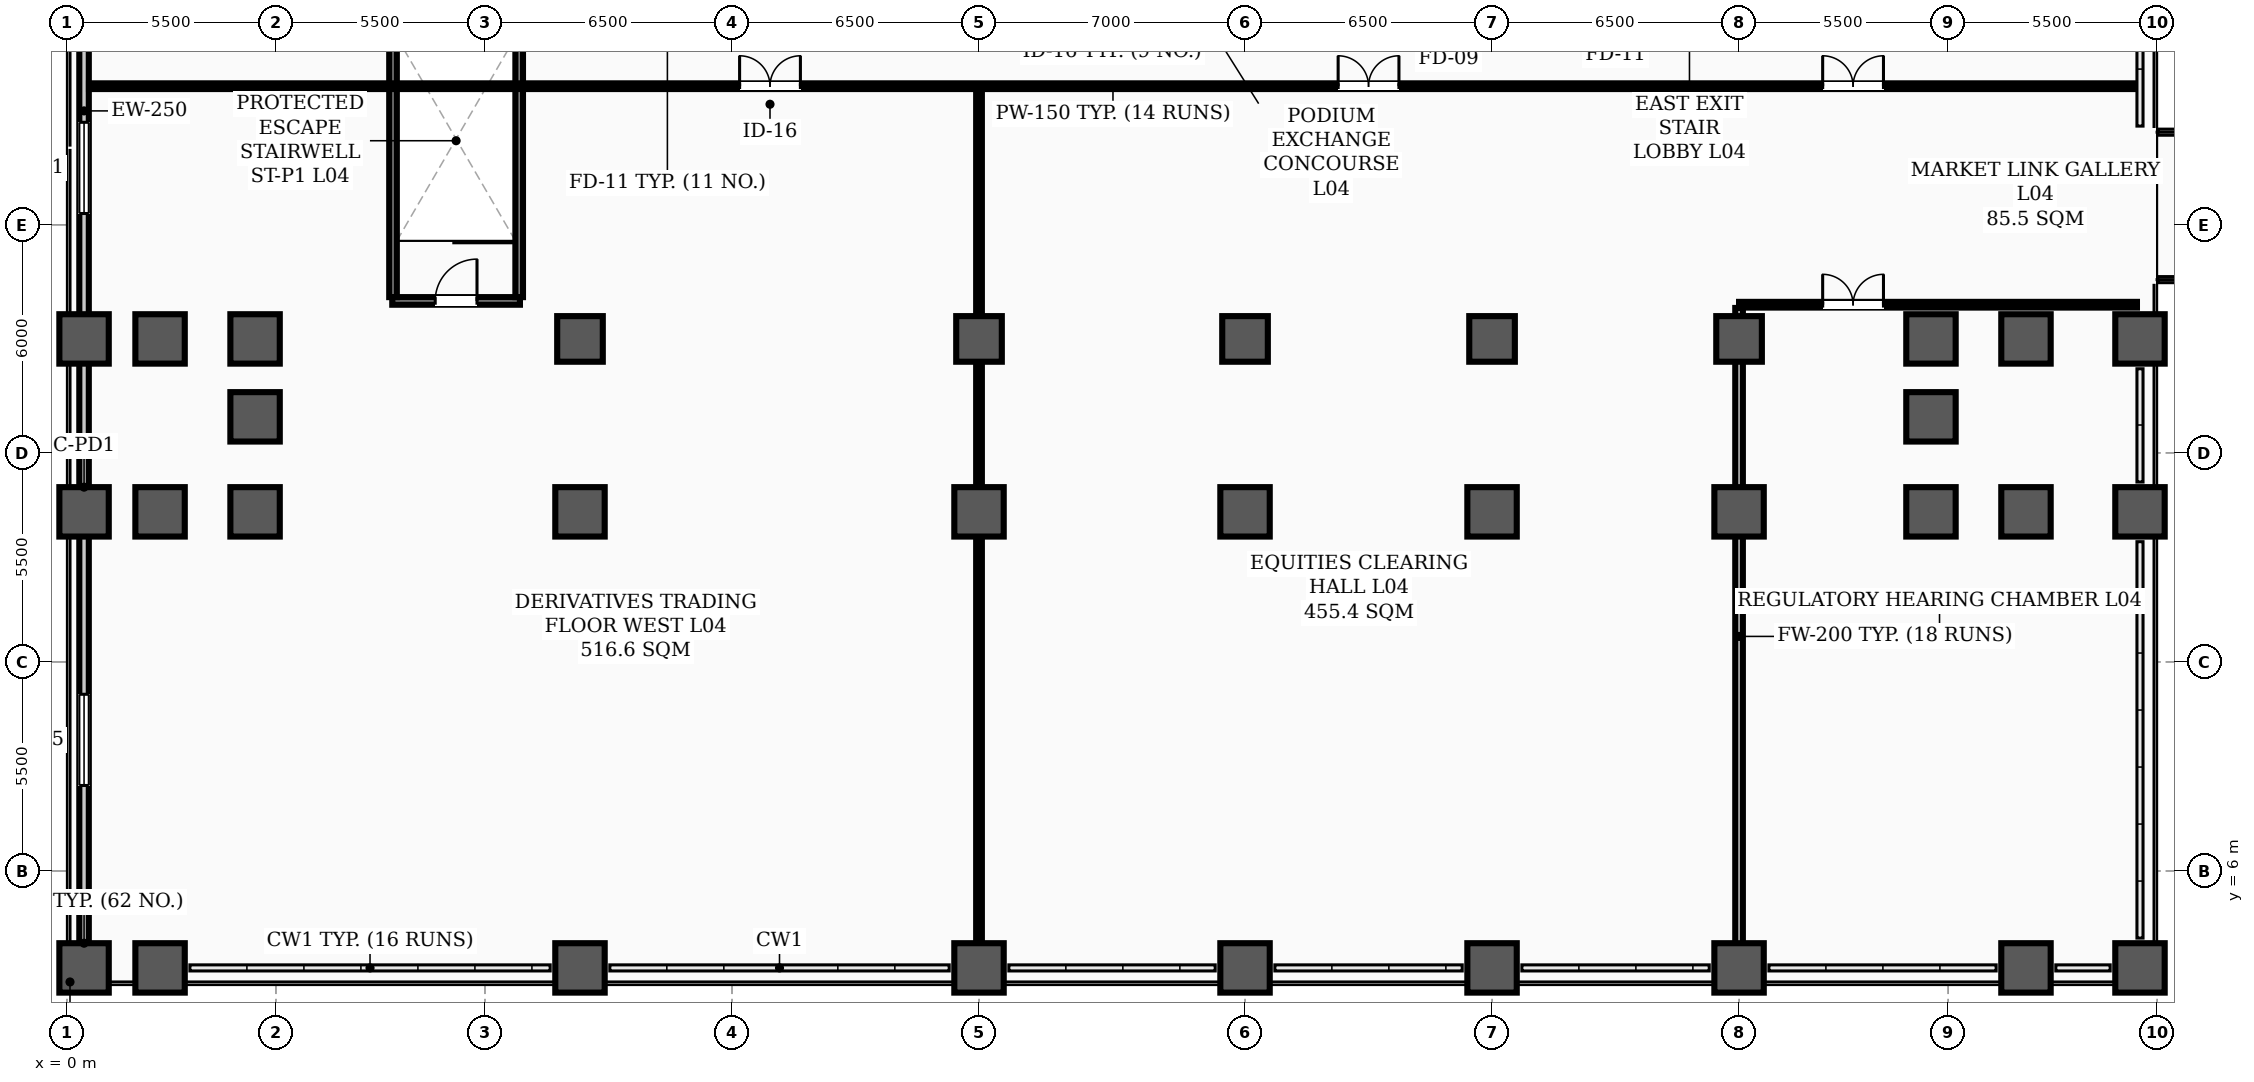
"""IFC4 building model, lengths in metres.
Left out: names, types, materials, properties, quantities, classifications, styles, units other than length and angle.
Written with IfcOpenShell. Run it as: python <this file> out.ifc"""

import sys

from ifc_helpers import new_model, si_unit, direction, frame, frame_2d, origin, origin_2d, place, context, subcontext, project, spatial, rectangle, hollow_rectangle, extrude, element, fill, save


model = new_model("IFC4")
c1 = context("Model", 3, precision=1e-05, world=origin(), true_north=direction((0.0, 1.0)))
c2 = subcontext(c1, "Body", "Model", "MODEL_VIEW")
j1 = project(units=[si_unit("LENGTHUNIT", "METRE"), si_unit("PLANEANGLEUNIT", "RADIAN")], contexts=[c1])
p1 = place(None, origin())
s1 = spatial("IfcSite", under=j1, at=p1, CompositionType="ELEMENT")
p2 = place(p1, origin())
s2 = spatial("IfcBuilding", under=s1, at=p2, CompositionType="ELEMENT")
p3 = place(p2, frame((0.0, 0.0, 16.6)))
s3 = spatial("IfcBuildingStorey", under=s2, at=p3, CompositionType="ELEMENT", Elevation=16.6)
for number, where, z_axis, x_axis in (
    (1, (13.5, 20.0, 0.0), (0.0, 0.0, 1.0), (1.0, 0.0, 0.0)),
    (2, (24.0, 20.0, 0.0), (0.0, 0.0, 1.0), (1.0, 0.0, 0.0)),
    (3, (31.0, 20.0, 0.0), (0.0, 0.0, 1.0), (1.0, 0.0, 0.0)),
    (4, (37.5, 20.0, 0.0), (0.0, 0.0, 1.0), (1.0, 0.0, 0.0)),
    (5, (44.0, 20.0, 0.0), (0.0, 0.0, 1.0), (1.0, 0.0, 0.0)),
):
    element("IfcColumn", number, at=place(p3, frame(where, z_axis=z_axis, x_axis=x_axis)), inside=s3, PredefinedType="COLUMN", context=c2, shape_type="SweptSolid", body=[
        extrude(hollow_rectangle(XDim=1.2, YDim=1.2, WallThickness=0.04, InnerFilletRadius=0.02, OuterFilletRadius=0.06, at=origin_2d()), origin(), (0.0, 0.0, 1.0), 5.4),
    ])
p4 = place(p3, frame((0.45, 3.45, 0.0), z_axis=(0.0, 0.0, 1.0), x_axis=(1.0, 0.0, 0.0)))
e6 = element("IfcColumn", 6, at=p4, inside=s3, PredefinedType="COLUMN", context=c2, shape_type="SweptSolid", body=[
    extrude(rectangle(XDim=1.3, YDim=1.3, at=origin_2d()), origin(), (0.0, 0.0, 1.0), 5.15),
])
for number, where, z_axis, x_axis in (
    (7, (0.45, 15.45, 0.0), (0.0, 0.0, 1.0), (1.0, 0.0, 0.0)),
    (8, (0.45, 20.0, 0.0), (0.0, 0.0, 1.0), (1.0, 0.0, 0.0)),
):
    element("IfcColumn", number, at=place(p3, frame(where, z_axis=z_axis, x_axis=x_axis)), inside=s3, PredefinedType="COLUMN", context=c2, shape_type="SweptSolid", body=[
        extrude(rectangle(XDim=1.3, YDim=1.3, at=origin_2d()), origin(), (0.0, 0.0, 1.0), 5.16),
    ])
p5 = place(p3, frame((2.45, 3.45, 0.0), z_axis=(0.0, 0.0, 1.0), x_axis=(1.0, 0.0, 0.0)))
e9 = element("IfcColumn", 9, at=p5, inside=s3, PredefinedType="COLUMN", context=c2, shape_type="SweptSolid", body=[
    extrude(rectangle(XDim=1.3, YDim=1.3, at=origin_2d()), origin(), (0.0, 0.0, 1.0), 5.15),
])
for number, where, z_axis, x_axis in (
    (10, (2.45, 15.45, 0.0), (0.0, 0.0, 1.0), (1.0, 0.0, 0.0)),
    (11, (2.45, 20.0, 0.0), (0.0, 0.0, 1.0), (1.0, 0.0, 0.0)),
    (12, (4.95, 15.45, 0.0), (0.0, 0.0, 1.0), (1.0, 0.0, 0.0)),
    (13, (4.95, 17.95, 0.0), (0.0, 0.0, 1.0), (1.0, 0.0, 0.0)),
    (14, (4.95, 20.0, 0.0), (0.0, 0.0, 1.0), (1.0, 0.0, 0.0)),
):
    element("IfcColumn", number, at=place(p3, frame(where, z_axis=z_axis, x_axis=x_axis)), inside=s3, PredefinedType="COLUMN", context=c2, shape_type="SweptSolid", body=[
        extrude(rectangle(XDim=1.3, YDim=1.3, at=origin_2d()), origin(), (0.0, 0.0, 1.0), 5.4),
    ])
p6 = place(p3, frame((13.5, 3.45, 0.0), z_axis=(0.0, 0.0, 1.0), x_axis=(1.0, 0.0, 0.0)))
e15 = element("IfcColumn", 15, at=p6, inside=s3, PredefinedType="COLUMN", context=c2, shape_type="SweptSolid", body=[
    extrude(rectangle(XDim=1.3, YDim=1.3, at=origin_2d()), origin(), (0.0, 0.0, 1.0), 5.15),
])
p7 = place(p3, frame((13.5, 15.45, 0.0), z_axis=(0.0, 0.0, 1.0), x_axis=(1.0, 0.0, 0.0)))
e16 = element("IfcColumn", 16, at=p7, inside=s3, PredefinedType="COLUMN", context=c2, shape_type="SweptSolid", body=[
    extrude(rectangle(XDim=1.3, YDim=1.3, at=origin_2d()), origin(), (0.0, 0.0, 1.0), 5.4),
])
p8 = place(p3, frame((24.0, 3.45, 0.0), z_axis=(0.0, 0.0, 1.0), x_axis=(1.0, 0.0, 0.0)))
e17 = element("IfcColumn", 17, at=p8, inside=s3, PredefinedType="COLUMN", context=c2, shape_type="SweptSolid", body=[
    extrude(rectangle(XDim=1.3, YDim=1.3, at=origin_2d()), origin(), (0.0, 0.0, 1.0), 5.15),
])
p9 = place(p3, frame((24.0, 15.45, 0.0), z_axis=(0.0, 0.0, 1.0), x_axis=(1.0, 0.0, 0.0)))
e18 = element("IfcColumn", 18, at=p9, inside=s3, PredefinedType="COLUMN", context=c2, shape_type="SweptSolid", body=[
    extrude(rectangle(XDim=1.3, YDim=1.3, at=origin_2d()), origin(), (0.0, 0.0, 1.0), 5.4),
])
p10 = place(p3, frame((31.0, 3.45, 0.0), z_axis=(0.0, 0.0, 1.0), x_axis=(1.0, 0.0, 0.0)))
e19 = element("IfcColumn", 19, at=p10, inside=s3, PredefinedType="COLUMN", context=c2, shape_type="SweptSolid", body=[
    extrude(rectangle(XDim=1.3, YDim=1.3, at=origin_2d()), origin(), (0.0, 0.0, 1.0), 5.15),
])
p11 = place(p3, frame((31.0, 15.45, 0.0), z_axis=(0.0, 0.0, 1.0), x_axis=(1.0, 0.0, 0.0)))
e20 = element("IfcColumn", 20, at=p11, inside=s3, PredefinedType="COLUMN", context=c2, shape_type="SweptSolid", body=[
    extrude(rectangle(XDim=1.3, YDim=1.3, at=origin_2d()), origin(), (0.0, 0.0, 1.0), 5.4),
])
p12 = place(p3, frame((37.5, 3.45, 0.0), z_axis=(0.0, 0.0, 1.0), x_axis=(1.0, 0.0, 0.0)))
e21 = element("IfcColumn", 21, at=p12, inside=s3, PredefinedType="COLUMN", context=c2, shape_type="SweptSolid", body=[
    extrude(rectangle(XDim=1.3, YDim=1.3, at=origin_2d()), origin(), (0.0, 0.0, 1.0), 5.15),
])
p13 = place(p3, frame((37.5, 15.45, 0.0), z_axis=(0.0, 0.0, 1.0), x_axis=(1.0, 0.0, 0.0)))
e22 = element("IfcColumn", 22, at=p13, inside=s3, PredefinedType="COLUMN", context=c2, shape_type="SweptSolid", body=[
    extrude(rectangle(XDim=1.3, YDim=1.3, at=origin_2d()), origin(), (0.0, 0.0, 1.0), 5.4),
])
p14 = place(p3, frame((44.0, 3.45, 0.0), z_axis=(0.0, 0.0, 1.0), x_axis=(1.0, 0.0, 0.0)))
e23 = element("IfcColumn", 23, at=p14, inside=s3, PredefinedType="COLUMN", context=c2, shape_type="SweptSolid", body=[
    extrude(rectangle(XDim=1.3, YDim=1.3, at=origin_2d()), origin(), (0.0, 0.0, 1.0), 5.15),
])
for number, where, z_axis, x_axis in (
    (24, (44.0, 15.45, 0.0), (0.0, 0.0, 1.0), (1.0, 0.0, 0.0)),
    (25, (49.05, 15.45, 0.0), (0.0, 0.0, 1.0), (1.0, 0.0, 0.0)),
    (26, (49.05, 17.95, 0.0), (0.0, 0.0, 1.0), (1.0, 0.0, 0.0)),
    (27, (49.05, 20.0, 0.0), (0.0, 0.0, 1.0), (1.0, 0.0, 0.0)),
):
    element("IfcColumn", number, at=place(p3, frame(where, z_axis=z_axis, x_axis=x_axis)), inside=s3, PredefinedType="COLUMN", context=c2, shape_type="SweptSolid", body=[
        extrude(rectangle(XDim=1.3, YDim=1.3, at=origin_2d()), origin(), (0.0, 0.0, 1.0), 5.4),
    ])
p15 = place(p3, frame((51.55, 3.45, 0.0), z_axis=(0.0, 0.0, 1.0), x_axis=(1.0, 0.0, 0.0)))
e28 = element("IfcColumn", 28, at=p15, inside=s3, PredefinedType="COLUMN", context=c2, shape_type="SweptSolid", body=[
    extrude(rectangle(XDim=1.3, YDim=1.3, at=origin_2d()), origin(), (0.0, 0.0, 1.0), 5.15),
])
for number, where, z_axis, x_axis in (
    (29, (51.55, 15.45, 0.0), (0.0, 0.0, 1.0), (1.0, 0.0, 0.0)),
    (30, (51.55, 20.0, 0.0), (0.0, 0.0, 1.0), (1.0, 0.0, 0.0)),
):
    element("IfcColumn", number, at=place(p3, frame(where, z_axis=z_axis, x_axis=x_axis)), inside=s3, PredefinedType="COLUMN", context=c2, shape_type="SweptSolid", body=[
        extrude(rectangle(XDim=1.3, YDim=1.3, at=origin_2d()), origin(), (0.0, 0.0, 1.0), 5.4),
    ])
p16 = place(p3, frame((54.55, 3.45, 0.0), z_axis=(0.0, 0.0, 1.0), x_axis=(1.0, 0.0, 0.0)))
e31 = element("IfcColumn", 31, at=p16, inside=s3, PredefinedType="COLUMN", context=c2, shape_type="SweptSolid", body=[
    extrude(rectangle(XDim=1.3, YDim=1.3, at=origin_2d()), origin(), (0.0, 0.0, 1.0), 5.15),
])
for number, where, z_axis, x_axis in (
    (32, (54.55, 15.45, 0.0), (0.0, 0.0, 1.0), (1.0, 0.0, 0.0)),
    (33, (54.55, 20.0, 0.0), (0.0, 0.0, 1.0), (1.0, 0.0, 0.0)),
):
    element("IfcColumn", number, at=place(p3, frame(where, z_axis=z_axis, x_axis=x_axis)), inside=s3, PredefinedType="COLUMN", context=c2, shape_type="SweptSolid", body=[
        extrude(rectangle(XDim=1.3, YDim=1.3, at=origin_2d()), origin(), (0.0, 0.0, 1.0), 5.16),
    ])
p17 = place(p3, frame((0.45, 3.45, 0.0), z_axis=(0.0, 0.0, 1.0), x_axis=(0.0, 1.0, 0.0)))
e34 = element("IfcWall", 34, at=p17, inside=s3, PredefinedType="STANDARD", context=c2, shape_type="SweptSolid", body=[
    extrude(rectangle(XDim=45.1, YDim=0.25, at=frame_2d((22.55, 0.0))), origin(), (0.0, 0.0, 1.0), 4.38),
])
p18 = place(p17, frame((4.8, 0.0, 0.9)))
e35 = element("IfcOpeningElement", 35, at=p18, cuts=e34, PredefinedType="OPENING", context=c2, shape_type="SweptSolid", body=[
    extrude(rectangle(XDim=2.4, YDim=2.1, at=frame_2d((1.2, 1.05))), frame((0.0, 0.135, 0.0), z_axis=(0.0, -1.0, 0.0), x_axis=(1.0, 0.0, 0.0)), (0.0, 0.0, 1.0), 0.27),
])
p19 = place(p17, frame((19.85, 0.0, 0.9)))
e36 = element("IfcOpeningElement", 36, at=p19, cuts=e34, PredefinedType="OPENING", context=c2, shape_type="SweptSolid", body=[
    extrude(rectangle(XDim=2.4, YDim=2.1, at=frame_2d((1.2, 1.05))), frame((0.0, 0.135, 0.0), z_axis=(0.0, -1.0, 0.0), x_axis=(1.0, 0.0, 0.0)), (0.0, 0.0, 1.0), 0.27),
])
p20 = place(p17, frame((29.0, 0.0, 0.9)))
e37 = element("IfcOpeningElement", 37, at=p20, cuts=e34, PredefinedType="OPENING", context=c2, shape_type="SweptSolid", body=[
    extrude(rectangle(XDim=2.4, YDim=2.1, at=frame_2d((1.2, 1.05))), frame((0.0, 0.135, 0.0), z_axis=(0.0, -1.0, 0.0), x_axis=(1.0, 0.0, 0.0)), (0.0, 0.0, 1.0), 0.27),
])
p21 = place(p17, frame((36.75, 0.0, 0.9)))
e38 = element("IfcOpeningElement", 38, at=p21, cuts=e34, PredefinedType="OPENING", context=c2, shape_type="SweptSolid", body=[
    extrude(rectangle(XDim=2.4, YDim=2.1, at=frame_2d((1.2, 1.05))), frame((0.0, 0.135, 0.0), z_axis=(0.0, -1.0, 0.0), x_axis=(1.0, 0.0, 0.0)), (0.0, 0.0, 1.0), 0.27),
])
p22 = place(p3, frame((8.56, 21.0, 0.0), z_axis=(0.0, 0.0, 1.0), x_axis=(1.0, 0.0, 0.0)))
e39 = element("IfcWall", 39, at=p22, inside=s3, PredefinedType="STANDARD", context=c2, shape_type="SweptSolid", body=[
    extrude(rectangle(XDim=3.36, YDim=0.2, at=frame_2d((1.68, 0.0))), origin(), (0.0, 0.0, 1.0), 5.16),
])
p23 = place(p22, frame((1.13, 0.0, 0.0)))
e40 = element("IfcOpeningElement", 40, at=p23, cuts=e39, PredefinedType="OPENING", context=c2, shape_type="SweptSolid", body=[
    extrude(rectangle(XDim=1.1, YDim=2.08, at=frame_2d((0.55, 1.04))), frame((0.0, 0.11, 0.0), z_axis=(0.0, -1.0, 0.0), x_axis=(1.0, 0.0, 0.0)), (0.0, 0.0, 1.0), 0.22),
])
for number, where, z_axis, x_axis in (
    (41, (8.58, 21.1, 0.0), (0.0, 0.0, 1.0), (0.0, 1.0, 0.0)),
    (42, (11.9, 21.1, 0.0), (0.0, 0.0, 1.0), (0.0, 1.0, 0.0)),
):
    element("IfcWall", number, at=place(p3, frame(where, z_axis=z_axis, x_axis=x_axis)), inside=s3, PredefinedType="STANDARD", context=c2, shape_type="SweptSolid", body=[
        extrude(rectangle(XDim=6.84, YDim=0.2, at=frame_2d((3.42, 0.0))), origin(), (0.0, 0.0, 1.0), 5.16),
    ])
p24 = place(p3, frame((0.58, 26.65, 0.0), z_axis=(0.0, 0.0, 1.0), x_axis=(1.0, 0.0, 0.0)))
e43 = element("IfcWall", 43, at=p24, inside=s3, PredefinedType="PARTITIONING", context=c2, shape_type="SweptSolid", body=[
    extrude(rectangle(XDim=53.89, YDim=0.15, at=frame_2d((26.945, 0.0))), origin(), (0.0, 0.0, 1.0), 3.74),
])
p25 = place(p24, frame((17.12, 0.0, 0.0)))
e44 = element("IfcOpeningElement", 44, at=p25, cuts=e43, PredefinedType="OPENING", context=c2, shape_type="SweptSolid", body=[
    extrude(rectangle(XDim=1.6, YDim=2.08, at=frame_2d((0.8, 1.04))), frame((0.0, 0.085, 0.0), z_axis=(0.0, -1.0, 0.0), x_axis=(1.0, 0.0, 0.0)), (0.0, 0.0, 1.0), 0.17),
])
p26 = place(p24, frame((32.87, 0.0, 0.0)))
e45 = element("IfcOpeningElement", 45, at=p26, cuts=e43, PredefinedType="OPENING", context=c2, shape_type="SweptSolid", body=[
    extrude(rectangle(XDim=1.6, YDim=2.08, at=frame_2d((0.8, 1.04))), frame((0.0, 0.085, 0.0), z_axis=(0.0, -1.0, 0.0), x_axis=(1.0, 0.0, 0.0)), (0.0, 0.0, 1.0), 0.17),
])
p27 = place(p24, frame((45.62, 0.0, 0.0)))
e46 = element("IfcOpeningElement", 46, at=p27, cuts=e43, PredefinedType="OPENING", context=c2, shape_type="SweptSolid", body=[
    extrude(rectangle(XDim=1.6, YDim=2.08, at=frame_2d((0.8, 1.04))), frame((0.0, 0.085, 0.0), z_axis=(0.0, -1.0, 0.0), x_axis=(1.0, 0.0, 0.0)), (0.0, 0.0, 1.0), 0.17),
])
p28 = place(p3, frame((44.0, 20.9, 0.0), z_axis=(0.0, 0.0, 1.0), x_axis=(1.0, 0.0, 0.0)))
e47 = element("IfcWall", 47, at=p28, inside=s3, PredefinedType="PARTITIONING", context=c2, shape_type="SweptSolid", body=[
    extrude(rectangle(XDim=10.47, YDim=0.15, at=frame_2d((5.235, 0.0))), origin(), (0.0, 0.0, 1.0), 3.74),
])
p29 = place(p28, frame((2.2, 0.0, 0.0)))
e48 = element("IfcOpeningElement", 48, at=p29, cuts=e47, PredefinedType="OPENING", context=c2, shape_type="SweptSolid", body=[
    extrude(rectangle(XDim=1.6, YDim=2.08, at=frame_2d((0.8, 1.04))), frame((0.0, 0.085, 0.0), z_axis=(0.0, -1.0, 0.0), x_axis=(1.0, 0.0, 0.0)), (0.0, 0.0, 1.0), 0.17),
])
p30 = place(p3, frame((24.0, 3.53, 0.0), z_axis=(0.0, 0.0, 1.0), x_axis=(0.0, 1.0, 0.0)))
e49 = element("IfcWall", 49, at=p30, inside=s3, PredefinedType="PARTITIONING", context=c2, shape_type="SweptSolid", body=[
    extrude(rectangle(XDim=23.035, YDim=0.15, at=frame_2d((11.518, 0.0))), origin(), (0.0, 0.0, 1.0), 3.74),
])
p31 = place(p3, frame((44.0, 3.53, 0.0), z_axis=(0.0, 0.0, 1.0), x_axis=(0.0, 1.0, 0.0)))
e50 = element("IfcWall", 50, at=p31, inside=s3, PredefinedType="STANDARD", context=c2, shape_type="SweptSolid", body=[
    extrude(rectangle(XDim=17.285, YDim=0.2, at=frame_2d((8.643, 0.0))), origin(), (0.0, 0.0, 1.0), 3.74),
])
p32 = place(p18, origin())
e51 = element("IfcWindow", 51, at=p32, inside=s3, PartitioningType="SINGLE_PANEL", PredefinedType="WINDOW", context=c2, shape_type="SweptSolid", body=[
    extrude(rectangle(XDim=2.4, YDim=2.1, at=frame_2d((1.2, 1.05))), frame((0.0, 0.03, 0.0), z_axis=(0.0, -1.0, 0.0), x_axis=(1.0, 0.0, 0.0)), (0.0, 0.0, 1.0), 0.06),
])
fill(e35, e51)
p33 = place(p19, origin())
e52 = element("IfcWindow", 52, at=p33, inside=s3, PartitioningType="SINGLE_PANEL", PredefinedType="WINDOW", context=c2, shape_type="SweptSolid", body=[
    extrude(rectangle(XDim=2.4, YDim=2.1, at=frame_2d((1.2, 1.05))), frame((0.0, 0.03, 0.0), z_axis=(0.0, -1.0, 0.0), x_axis=(1.0, 0.0, 0.0)), (0.0, 0.0, 1.0), 0.06),
])
fill(e36, e52)
p34 = place(p23, origin())
e53 = element("IfcDoor", 53, at=p34, inside=s3, OperationType="SINGLE_SWING_RIGHT", PredefinedType="DOOR", context=c2, shape_type="SweptSolid", body=[
    extrude(rectangle(XDim=1.1, YDim=2.08, at=frame_2d((0.55, 1.04))), frame((0.0, 0.025, 0.0), z_axis=(0.0, -1.0, 0.0), x_axis=(1.0, 0.0, 0.0)), (0.0, 0.0, 1.0), 0.05),
])
fill(e40, e53)
p35 = place(p25, origin())
e54 = element("IfcDoor", 54, at=p35, inside=s3, OperationType="DOUBLE_DOOR_SINGLE_SWING", PredefinedType="DOOR", context=c2, shape_type="SweptSolid", body=[
    extrude(rectangle(XDim=1.6, YDim=2.08, at=frame_2d((0.8, 1.04))), frame((0.0, 0.025, 0.0), z_axis=(0.0, -1.0, 0.0), x_axis=(1.0, 0.0, 0.0)), (0.0, 0.0, 1.0), 0.05),
])
fill(e44, e54)
p36 = place(p26, origin())
e55 = element("IfcDoor", 55, at=p36, inside=s3, OperationType="DOUBLE_DOOR_SINGLE_SWING", PredefinedType="DOOR", context=c2, shape_type="SweptSolid", body=[
    extrude(rectangle(XDim=1.6, YDim=2.08, at=frame_2d((0.8, 1.04))), frame((0.0, 0.025, 0.0), z_axis=(0.0, -1.0, 0.0), x_axis=(1.0, 0.0, 0.0)), (0.0, 0.0, 1.0), 0.05),
])
fill(e45, e55)
p37 = place(p29, origin())
e56 = element("IfcDoor", 56, at=p37, inside=s3, OperationType="DOUBLE_DOOR_SINGLE_SWING", PredefinedType="DOOR", context=c2, shape_type="SweptSolid", body=[
    extrude(rectangle(XDim=1.6, YDim=2.08, at=frame_2d((0.8, 1.04))), frame((0.0, 0.025, 0.0), z_axis=(0.0, -1.0, 0.0), x_axis=(1.0, 0.0, 0.0)), (0.0, 0.0, 1.0), 0.05),
])
fill(e48, e56)
p38 = place(p27, origin())
e57 = element("IfcDoor", 57, at=p38, inside=s3, OperationType="DOUBLE_DOOR_SINGLE_SWING", PredefinedType="DOOR", context=c2, shape_type="SweptSolid", body=[
    extrude(rectangle(XDim=1.6, YDim=2.08, at=frame_2d((0.8, 1.04))), frame((0.0, 0.025, 0.0), z_axis=(0.0, -1.0, 0.0), x_axis=(1.0, 0.0, 0.0)), (0.0, 0.0, 1.0), 0.05),
])
fill(e46, e57)
save(model, sys.argv[1])
